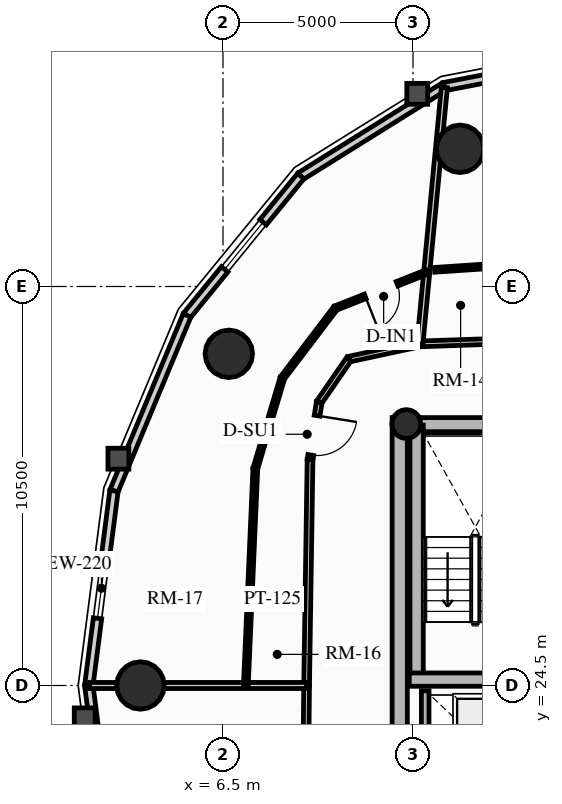
"""IFC4 building model, lengths in metres.
Left out: names, types, materials, properties, quantities, classifications, styles, units other than length and angle.
Written with IfcOpenShell. Run it as: python <this file> out.ifc"""

import sys

from ifc_helpers import new_model, si_unit, direction, frame, frame_2d, origin, origin_2d, place, context, subcontext, project, spatial, rectangle, circle, hollow_circle, extrude, source, transform, mapped, element, fill, save


model = new_model("IFC4")
c1 = context("Model", 3, precision=1e-05, world=origin(), true_north=direction((0.0, 1.0)))
c2 = subcontext(c1, "Body", "Model", "MODEL_VIEW")
j1 = project(units=[si_unit("LENGTHUNIT", "METRE"), si_unit("PLANEANGLEUNIT", "RADIAN")], contexts=[c1])
p1 = place(None, origin())
s1 = spatial("IfcSite", under=j1, at=p1, CompositionType="ELEMENT")
p2 = place(p1, origin())
s2 = spatial("IfcBuilding", under=s1, at=p2, CompositionType="ELEMENT")
p3 = place(p2, frame((0.0, 0.0, 183.61)))
s3 = spatial("IfcBuildingStorey", under=s2, at=p3, CompositionType="ELEMENT", Elevation=183.61)
p4 = place(p3, frame((11.15, 17.45, 0.0), z_axis=(0.0, 0.0, 1.0), x_axis=(0.0, 1.0, 0.0)))
e1 = element("IfcWall", 1, at=p4, inside=s3, PredefinedType="SHEAR", context=c2, shape_type="SweptSolid", body=[
    extrude(rectangle(XDim=14.1, YDim=0.4, at=frame_2d((7.05, 0.0))), origin(), (0.0, 0.0, 1.0), 2.91),
])
p5 = place(p3, frame((11.15, 31.35, 0.0), z_axis=(0.0, 0.0, 1.0), x_axis=(1.0, 0.0, 0.0)))
e2 = element("IfcWall", 2, at=p5, inside=s3, PredefinedType="SHEAR", context=c2, shape_type="SweptSolid", body=[
    extrude(rectangle(XDim=10.7, YDim=0.4, at=frame_2d((5.35, 0.0))), origin(), (0.0, 0.0, 1.0), 2.91),
])
m1 = source(origin(), c2, "Body", "SweptSolid", [
    extrude(rectangle(XDim=1.5, YDim=2.02, at=frame_2d((0.75, 1.01))), frame((0.0, 0.21, 0.0), z_axis=(0.0, -1.0, 0.0), x_axis=(1.0, 0.0, 0.0)), (0.0, 0.0, 1.0), 0.42),
])
p6 = place(p5, frame((4.6, 0.0, 0.0)))
e3 = element("IfcOpeningElement", 3, at=p6, cuts=e2, PredefinedType="OPENING", context=c2, shape_type="MappedRepresentation", body=[
    mapped(m1, transform((0.0, 0.0, 0.0), x_axis=(1.0, 0.0, 0.0), y_axis=(0.0, 1.0, 0.0), z_axis=(0.0, 0.0, 1.0), scale=1.0)),
])
p7 = place(p3, frame((11.595, 24.655, 0.0), z_axis=(0.0, 0.0, 1.0), x_axis=(0.0, 1.0, 0.0)))
e4 = element("IfcWall", 4, at=p7, inside=s3, PredefinedType="SHEAR", context=c2, shape_type="SweptSolid", body=[
    extrude(rectangle(XDim=6.695, YDim=0.35, at=frame_2d((3.348, 0.0))), origin(), (0.0, 0.0, 1.0), 2.91),
])
p8 = place(p3, frame((11.4, 24.655, 0.0), z_axis=(0.0, 0.0, 1.0), x_axis=(1.0, 0.0, 0.0)))
e5 = element("IfcWall", 5, at=p8, inside=s3, PredefinedType="SHEAR", context=c2, shape_type="SweptSolid", body=[
    extrude(rectangle(XDim=3.285, YDim=0.35, at=frame_2d((1.643, 0.0))), origin(), (0.0, 0.0, 1.0), 2.91),
])
p9 = place(p3, frame((11.325, 31.38, 0.0), z_axis=(0.0, 0.0, 1.0), x_axis=(1.0, 0.0, 0.0)))
e6 = element("IfcColumn", 6, at=p9, inside=s3, PredefinedType="COLUMN", context=c2, shape_type="SweptSolid", body=[
    extrude(hollow_circle(Radius=0.38, WallThickness=0.032, at=origin_2d()), origin(), (0.0, 0.0, 1.0), 2.91),
])
for number, where, z_axis, x_axis in (
    (7, (12.739, 38.623, 0.0), (0.0, 0.0, 1.0), (1.0, 0.0, 0.0)),
    (8, (6.653, 33.229, 0.0), (0.0, 0.0, 1.0), (1.0, 0.0, 0.0)),
    (9, (4.328, 24.5, 0.0), (0.0, 0.0, 1.0), (1.0, 0.0, 0.0)),
):
    element("IfcColumn", number, at=place(p3, frame(where, z_axis=z_axis, x_axis=x_axis)), inside=s3, PredefinedType="USERDEFINED", context=c2, shape_type="SweptSolid", body=[
        extrude(circle(Radius=0.625, at=origin_2d()), origin(), (0.0, 0.0, 1.0), 2.91),
    ])
p10 = place(p3, frame((12.319, 40.259, 0.0), z_axis=(0.0, 0.0, 1.0), x_axis=(0.981703883443, 0.190413983815, 0.0)))
e10 = element("IfcWall", 10, at=p10, inside=s3, PredefinedType="SOLIDWALL", context=c2, shape_type="SweptSolid", body=[
    extrude(rectangle(XDim=4.259, YDim=0.22, at=frame_2d((2.13, 0.0))), origin(), (0.0, 0.0, 1.0), 2.245),
])
m2 = source(origin(), c2, "Body", "SweptSolid", [
    extrude(rectangle(XDim=1.6, YDim=1.3, at=frame_2d((0.8, 0.65))), frame((0.0, 0.12, 0.0), z_axis=(0.0, -1.0, 0.0), x_axis=(1.0, 0.0, 0.0)), (0.0, 0.0, 1.0), 0.24),
])
p11 = place(p10, frame((1.33, 0.0, 0.65)))
e11 = element("IfcOpeningElement", 11, at=p11, cuts=e10, PredefinedType="OPENING", context=c2, shape_type="MappedRepresentation", body=[
    mapped(m2, transform((0.0, 0.0, 0.0), x_axis=(1.0, 0.0, 0.0), y_axis=(0.0, 1.0, 0.0), z_axis=(0.0, 0.0, 1.0), scale=1.0)),
])
p12 = place(p3, frame((8.547, 37.906, 0.0), z_axis=(0.0, 0.0, 1.0), x_axis=(0.848399108042, 0.529357113368, 0.0)))
e12 = element("IfcWall", 12, at=p12, inside=s3, PredefinedType="SOLIDWALL", context=c2, shape_type="SweptSolid", body=[
    extrude(rectangle(XDim=4.446, YDim=0.22, at=frame_2d((2.223, 0.0))), origin(), (0.0, 0.0, 1.0), 2.245),
])
p13 = place(p3, frame((5.553, 34.24, 0.0), z_axis=(0.0, 0.0, 1.0), x_axis=(0.632470615287, 0.774584353572, 0.0)))
e13 = element("IfcWall", 13, at=p13, inside=s3, PredefinedType="SOLIDWALL", context=c2, shape_type="SweptSolid", body=[
    extrude(rectangle(XDim=4.733, YDim=0.22, at=frame_2d((2.366, 0.0))), origin(), (0.0, 0.0, 1.0), 2.245),
])
p14 = place(p13, frame((1.566, 0.0, 0.65)))
e14 = element("IfcOpeningElement", 14, at=p14, cuts=e13, PredefinedType="OPENING", context=c2, shape_type="MappedRepresentation", body=[
    mapped(m2, transform((0.0, 0.0, 0.0), x_axis=(1.0, 0.0, 0.0), y_axis=(0.0, 1.0, 0.0), z_axis=(0.0, 0.0, 1.0), scale=1.0)),
])
p15 = place(p3, frame((3.631, 29.62, 0.0), z_axis=(0.0, 0.0, 1.0), x_axis=(0.384144094086, 0.923273152961, 0.0)))
e15 = element("IfcWall", 15, at=p15, inside=s3, PredefinedType="SOLIDWALL", context=c2, shape_type="SweptSolid", body=[
    extrude(rectangle(XDim=5.003, YDim=0.22, at=frame_2d((2.501, 0.0))), origin(), (0.0, 0.0, 1.0), 2.245),
])
p16 = place(p3, frame((2.969, 24.5, 0.0), z_axis=(0.0, 0.0, 1.0), x_axis=(0.128287912609, 0.991736966881, 0.0)))
e16 = element("IfcWall", 16, at=p16, inside=s3, PredefinedType="SOLIDWALL", context=c2, shape_type="SweptSolid", body=[
    extrude(rectangle(XDim=5.163, YDim=0.22, at=frame_2d((2.582, 0.0))), origin(), (0.0, 0.0, 1.0), 2.245),
])
p17 = place(p16, frame((1.782, 0.0, 0.65)))
e17 = element("IfcOpeningElement", 17, at=p17, cuts=e16, PredefinedType="OPENING", context=c2, shape_type="MappedRepresentation", body=[
    mapped(m2, transform((0.0, 0.0, 0.0), x_axis=(1.0, 0.0, 0.0), y_axis=(0.0, 1.0, 0.0), z_axis=(0.0, 0.0, 1.0), scale=1.0)),
])
p18 = place(p3, frame((3.631, 19.38, 0.0), z_axis=(0.0, 0.0, 1.0), x_axis=(-0.128287912609, 0.991736966881, 0.0)))
e18 = element("IfcWall", 18, at=p18, inside=s3, PredefinedType="SOLIDWALL", context=c2, shape_type="SweptSolid", body=[
    extrude(rectangle(XDim=5.163, YDim=0.22, at=frame_2d((2.582, 0.0))), origin(), (0.0, 0.0, 1.0), 2.245),
])
p19 = place(p3, frame((11.82, 21.92, 0.0), z_axis=(0.0, 0.0, 1.0), x_axis=(0.0, 1.0, 0.0)))
e19 = element("IfcWall", 19, at=p19, inside=s3, PredefinedType="SHEAR", context=c2, shape_type="SweptSolid", body=[
    extrude(rectangle(XDim=2.44, YDim=0.2, at=frame_2d((1.22, 0.0))), origin(), (0.0, 0.0, 1.0), 2.91),
])
p20 = place(p3, frame((18.123, 33.709, 0.0), z_axis=(0.0, 0.0, 1.0), x_axis=(-0.999417459976, -0.034128297572, 0.0)))
e20 = element("IfcWall", 20, at=p20, inside=s3, PredefinedType="PARTITIONING", context=c2, shape_type="SweptSolid", body=[
    extrude(rectangle(XDim=6.445, YDim=0.15, at=frame_2d((3.223, 0.0))), origin(), (0.0, 0.0, 1.0), 2.245),
])
p21 = place(p3, frame((11.681, 33.49, 0.0), z_axis=(0.0, 0.0, 1.0), x_axis=(-0.977628265995, -0.2103401377, 0.0)))
e21 = element("IfcWall", 21, at=p21, inside=s3, PredefinedType="PARTITIONING", context=c2, shape_type="SweptSolid", body=[
    extrude(rectangle(XDim=1.912, YDim=0.15, at=frame_2d((0.956, 0.0))), origin(), (0.0, 0.0, 1.0), 2.245),
])
p22 = place(p3, frame((9.812, 33.087, 0.0), z_axis=(0.0, 0.0, 1.0), x_axis=(-0.567811958729, -0.823158295545, 0.0)))
e22 = element("IfcWall", 22, at=p22, inside=s3, PredefinedType="PARTITIONING", context=c2, shape_type="SweptSolid", body=[
    extrude(rectangle(XDim=1.372, YDim=0.15, at=frame_2d((0.686, 0.0))), origin(), (0.0, 0.0, 1.0), 2.245),
])
p23 = place(p3, frame((9.033, 31.958, 0.0), z_axis=(0.0, 0.0, 1.0), x_axis=(-0.158344987388, -0.98738384885, 0.0)))
e23 = element("IfcWall", 23, at=p23, inside=s3, PredefinedType="PARTITIONING", context=c2, shape_type="SweptSolid", body=[
    extrude(rectangle(XDim=1.531, YDim=0.15, at=frame_2d((0.766, 0.0))), origin(), (0.0, 0.0, 1.0), 2.245),
])
m3 = source(origin(), c2, "Body", "SweptSolid", [
    extrude(rectangle(XDim=1.05, YDim=2.015, at=frame_2d((0.525, 1.007))), frame((0.0, 0.085, 0.0), z_axis=(0.0, -1.0, 0.0), x_axis=(1.0, 0.0, 0.0)), (0.0, 0.0, 1.0), 0.17),
])
p24 = place(p23, frame((0.361, 0.0, 0.0)))
e24 = element("IfcOpeningElement", 24, at=p24, cuts=e23, PredefinedType="OPENING", context=c2, shape_type="MappedRepresentation", body=[
    mapped(m3, transform((0.0, 0.0, 0.0), x_axis=(1.0, 0.0, 0.0), y_axis=(0.0, 1.0, 0.0), z_axis=(0.0, 0.0, 1.0), scale=1.0)),
])
p25 = place(p3, frame((8.791, 30.446, 0.0), z_axis=(0.0, 0.0, 1.0), x_axis=(-0.015230619426, -0.999884007389, 0.0)))
e25 = element("IfcWall", 25, at=p25, inside=s3, PredefinedType="PARTITIONING", context=c2, shape_type="SweptSolid", body=[
    extrude(rectangle(XDim=5.947, YDim=0.15, at=frame_2d((2.974, 0.0))), origin(), (0.0, 0.0, 1.0), 2.675),
])
p26 = place(p3, frame((8.7, 24.5, 0.0), z_axis=(0.0, 0.0, 1.0), x_axis=(-0.010507512335, -0.999944794568, 0.0)))
e26 = element("IfcWall", 26, at=p26, inside=s3, PredefinedType="PARTITIONING", context=c2, shape_type="SweptSolid", body=[
    extrude(rectangle(XDim=6.064, YDim=0.15, at=frame_2d((3.032, 0.0))), origin(), (0.0, 0.0, 1.0), 2.245),
])
p27 = place(p3, frame((11.681, 33.49, 0.0), z_axis=(0.0, 0.0, 1.0), x_axis=(0.094975594504, 0.995479601222, 0.0)))
e27 = element("IfcWall", 27, at=p27, inside=s3, PredefinedType="PARTITIONING", context=c2, shape_type="SweptSolid", body=[
    extrude(rectangle(XDim=6.781, YDim=0.16, at=frame_2d((3.391, 0.0))), origin(), (0.0, 0.0, 1.0), 2.245),
])
p28 = place(p3, frame((8.7, 24.5, 0.0), z_axis=(0.0, 0.0, 1.0), x_axis=(-1.0, 0.0, 0.0)))
e28 = element("IfcWall", 28, at=p28, inside=s3, PredefinedType="PARTITIONING", context=c2, shape_type="SweptSolid", body=[
    extrude(rectangle(XDim=5.711, YDim=0.16, at=frame_2d((2.855, 0.0))), origin(), (0.0, 0.0, 1.0), 2.245),
])
p29 = place(p3, frame((14.848, 35.625, 0.0), z_axis=(0.0, 0.0, 1.0), x_axis=(-0.997750908336, -0.067030775874, 0.0)))
e29 = element("IfcWall", 29, at=p29, inside=s3, PredefinedType="PARTITIONING", context=c2, shape_type="SweptSolid", body=[
    extrude(rectangle(XDim=2.786, YDim=0.125, at=frame_2d((1.393, 0.0))), origin(), (0.0, 0.0, 1.0), 2.245),
])
m4 = source(origin(), c2, "Body", "SweptSolid", [
    extrude(rectangle(XDim=0.9, YDim=2.005, at=frame_2d((0.45, 1.002))), frame((0.0, 0.073, 0.0), z_axis=(0.0, -1.0, 0.0), x_axis=(1.0, 0.0, 0.0)), (0.0, 0.0, 1.0), 0.145),
])
p30 = place(p29, frame((0.12, 0.0, 0.0)))
e30 = element("IfcOpeningElement", 30, at=p30, cuts=e29, PredefinedType="OPENING", context=c2, shape_type="MappedRepresentation", body=[
    mapped(m4, transform((0.0, 0.0, 0.0), x_axis=(1.0, 0.0, 0.0), y_axis=(0.0, 1.0, 0.0), z_axis=(0.0, 0.0, 1.0), scale=1.0)),
])
p31 = place(p3, frame((11.861, 35.38, 0.0), z_axis=(0.0, 0.0, 1.0), x_axis=(-0.930124609977, -0.367244074037, 0.0)))
e31 = element("IfcWall", 31, at=p31, inside=s3, PredefinedType="PARTITIONING", context=c2, shape_type="SweptSolid", body=[
    extrude(rectangle(XDim=2.581, YDim=0.125, at=frame_2d((1.291, 0.0))), origin(), (0.0, 0.0, 1.0), 2.245),
])
p32 = place(p31, frame((0.84, 0.0, 0.0)))
e32 = element("IfcOpeningElement", 32, at=p32, cuts=e31, PredefinedType="OPENING", context=c2, shape_type="MappedRepresentation", body=[
    mapped(m4, transform((0.0, 0.0, 0.0), x_axis=(1.0, 0.0, 0.0), y_axis=(0.0, 1.0, 0.0), z_axis=(0.0, 0.0, 1.0), scale=1.0)),
])
p33 = place(p3, frame((9.461, 34.432, 0.0), z_axis=(0.0, 0.0, 1.0), x_axis=(-0.605297668278, -0.795999204005, 0.0)))
e33 = element("IfcWall", 33, at=p33, inside=s3, PredefinedType="PARTITIONING", context=c2, shape_type="SweptSolid", body=[
    extrude(rectangle(XDim=2.31, YDim=0.125, at=frame_2d((1.155, 0.0))), origin(), (0.0, 0.0, 1.0), 2.245),
])
p34 = place(p3, frame((8.063, 32.594, 0.0), z_axis=(0.0, 0.0, 1.0), x_axis=(-0.286473203627, -0.958088254601, 0.0)))
e34 = element("IfcWall", 34, at=p34, inside=s3, PredefinedType="PARTITIONING", context=c2, shape_type="SweptSolid", body=[
    extrude(rectangle(XDim=2.484, YDim=0.125, at=frame_2d((1.242, 0.0))), origin(), (0.0, 0.0, 1.0), 2.245),
])
p35 = place(p3, frame((7.351, 30.213, 0.0), z_axis=(0.0, 0.0, 1.0), x_axis=(-0.043800331293, -0.999040304982, 0.0)))
e35 = element("IfcWall", 35, at=p35, inside=s3, PredefinedType="PARTITIONING", context=c2, shape_type="SweptSolid", body=[
    extrude(rectangle(XDim=5.719, YDim=0.125, at=frame_2d((2.859, 0.0))), origin(), (0.0, 0.0, 1.0), 2.675),
])
m5 = source(origin(), c2, "Body", "SweptSolid", [
    extrude(rectangle(XDim=1.6, YDim=1.3, at=frame_2d((0.8, 0.65))), frame((0.0, 0.03, 0.0), z_axis=(0.0, -1.0, 0.0), x_axis=(1.0, 0.0, 0.0)), (0.0, 0.0, 1.0), 0.06),
])
p36 = place(p14, origin())
e36 = element("IfcWindow", 36, at=p36, inside=s3, PartitioningType="SINGLE_PANEL", PredefinedType="WINDOW", context=c2, shape_type="MappedRepresentation", body=[
    mapped(m5, transform((0.0, 0.0, 0.0), x_axis=(1.0, 0.0, 0.0), y_axis=(0.0, 1.0, 0.0), z_axis=(0.0, 0.0, 1.0), scale=1.0)),
])
fill(e14, e36)
p37 = place(p17, origin())
e37 = element("IfcWindow", 37, at=p37, inside=s3, PartitioningType="SINGLE_PANEL", PredefinedType="WINDOW", context=c2, shape_type="MappedRepresentation", body=[
    mapped(m5, transform((0.0, 0.0, 0.0), x_axis=(1.0, 0.0, 0.0), y_axis=(0.0, 1.0, 0.0), z_axis=(0.0, 0.0, 1.0), scale=1.0)),
])
fill(e17, e37)
m6 = source(origin(), c2, "Body", "SweptSolid", [
    extrude(rectangle(XDim=1.05, YDim=2.015, at=frame_2d((0.525, 1.007))), frame((0.0, 0.025, 0.0), z_axis=(0.0, -1.0, 0.0), x_axis=(1.0, 0.0, 0.0)), (0.0, 0.0, 1.0), 0.05),
])
p38 = place(p24, origin())
e38 = element("IfcDoor", 38, at=p38, inside=s3, OperationType="SINGLE_SWING_LEFT", PredefinedType="DOOR", context=c2, shape_type="MappedRepresentation", body=[
    mapped(m6, transform((0.0, 0.0, 0.0), x_axis=(1.0, 0.0, 0.0), y_axis=(0.0, 1.0, 0.0), z_axis=(0.0, 0.0, 1.0), scale=1.0)),
])
fill(e24, e38)
m7 = source(origin(), c2, "Body", "SweptSolid", [
    extrude(rectangle(XDim=0.9, YDim=2.005, at=frame_2d((0.45, 1.002))), frame((0.0, 0.025, 0.0), z_axis=(0.0, -1.0, 0.0), x_axis=(1.0, 0.0, 0.0)), (0.0, 0.0, 1.0), 0.05),
])
p39 = place(p32, origin())
e39 = element("IfcDoor", 39, at=p39, inside=s3, OperationType="SINGLE_SWING_RIGHT", PredefinedType="DOOR", context=c2, shape_type="MappedRepresentation", body=[
    mapped(m7, transform((0.0, 0.0, 0.0), x_axis=(1.0, 0.0, 0.0), y_axis=(0.0, 1.0, 0.0), z_axis=(0.0, 0.0, 1.0), scale=1.0)),
])
fill(e32, e39)
save(model, sys.argv[1])
